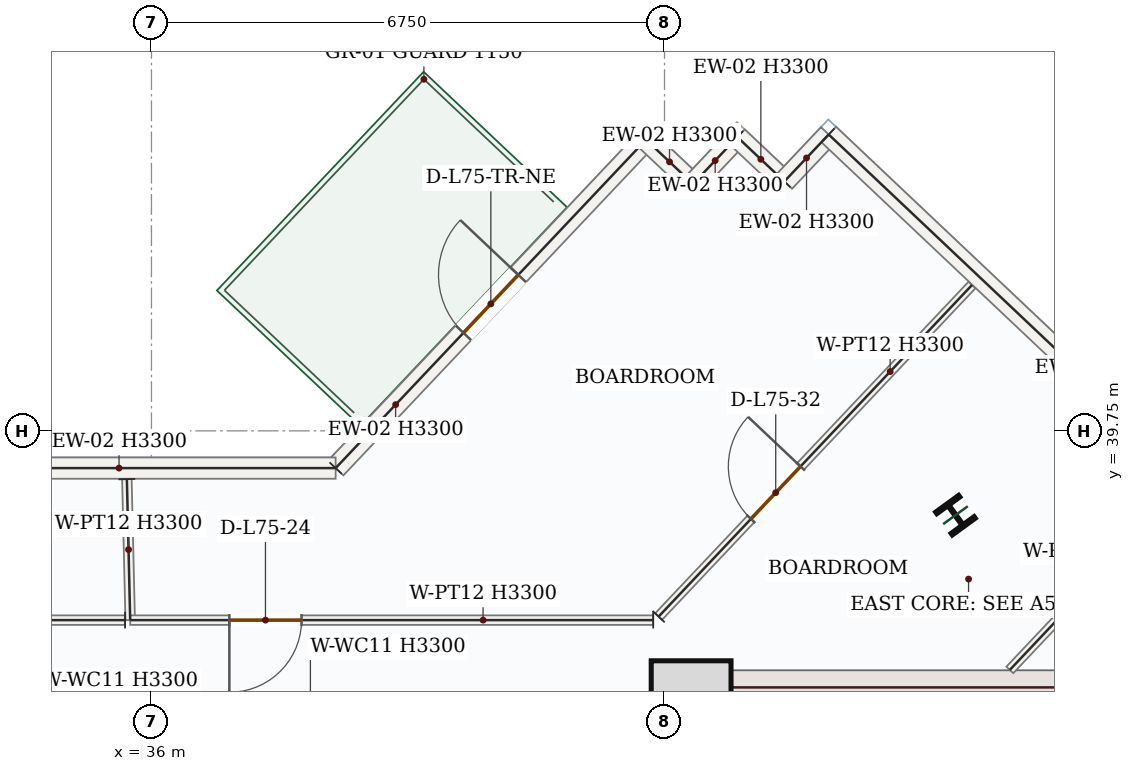
"""IFC4 building model, lengths in metres.
Left out: names, types, materials, properties, quantities, classifications, styles, units other than length and angle.
Written with IfcOpenShell. Run it as: python <this file> out.ifc"""

import sys

from ifc_helpers import new_model, si_unit, direction, frame, frame_2d, origin, origin_2d, place, context, subcontext, project, spatial, rectangle, i_section, extrude, source, transform, mapped, element, fill, save


model = new_model("IFC4")
c1 = context("Model", 3, precision=1e-05, world=origin(), true_north=direction((0.0, 1.0)))
c2 = subcontext(c1, "Body", "Model", "MODEL_VIEW")
j1 = project(units=[si_unit("LENGTHUNIT", "METRE"), si_unit("PLANEANGLEUNIT", "RADIAN")], contexts=[c1])
p1 = place(None, origin())
s1 = spatial("IfcSite", under=j1, at=p1, CompositionType="ELEMENT")
p2 = place(p1, origin())
s2 = spatial("IfcBuilding", under=s1, at=p2, CompositionType="ELEMENT")
p3 = place(p2, frame((0.0, 0.0, 310.35)))
s3 = spatial("IfcBuildingStorey", under=s2, at=p3, CompositionType="ELEMENT", Elevation=310.35)
p4 = place(p3, frame((42.975, 28.05, 0.0), z_axis=(0.0, 0.0, 1.0), x_axis=(0.0, 1.0, 0.0)))
e1 = element("IfcWall", 1, at=p4, inside=s3, PredefinedType="SHEAR", context=c2, shape_type="SweptSolid", body=[
    extrude(rectangle(XDim=8.55, YDim=0.45, at=frame_2d((4.275, 0.0))), origin(), (0.0, 0.0, 1.0), 3.3),
])
p5 = place(p4, frame((1.5, 0.0, 0.0)))
e2 = element("IfcOpeningElement", 2, at=p5, cuts=e1, PredefinedType="OPENING", context=c2, shape_type="SweptSolid", body=[
    extrude(rectangle(XDim=1.1, YDim=2.2, at=frame_2d((0.55, 1.1))), frame((0.0, 0.235, 0.0), z_axis=(0.0, -1.0, 0.0), x_axis=(1.0, 0.0, 0.0)), (0.0, 0.0, 1.0), 0.47),
])
m1 = source(origin(), c2, "Body", "SweptSolid", [
    extrude(rectangle(XDim=7.1, YDim=0.45, at=frame_2d((3.55, 0.0))), origin(), (0.0, 0.0, 1.0), 3.3),
])
p6 = place(p3, frame((43.2, 36.375, 0.0), z_axis=(0.0, 0.0, 1.0), x_axis=(1.0, 0.0, 0.0)))
e3 = element("IfcWall", 3, at=p6, inside=s3, PredefinedType="SHEAR", context=c2, shape_type="MappedRepresentation", body=[
    mapped(m1, transform((0.0, 0.0, 0.0), x_axis=(1.0, 0.0, 0.0), y_axis=(0.0, 1.0, 0.0), z_axis=(0.0, 0.0, 1.0), scale=1.0)),
])
m2 = source(origin(), c2, "Body", "SweptSolid", [
    extrude(rectangle(XDim=1.05, YDim=1.05, at=origin_2d()), origin(), (0.0, 0.0, 1.0), 3.75),
])
p7 = place(p3, frame((43.1, 36.2, 0.0), z_axis=(0.0, 0.0, 1.0), x_axis=(1.0, 0.0, 0.0)))
e4 = element("IfcColumn", 4, at=p7, inside=s3, PredefinedType="COLUMN", context=c2, shape_type="MappedRepresentation", body=[
    mapped(m2, transform((0.0, 0.0, 0.0), x_axis=(1.0, 0.0, 0.0), y_axis=(0.0, 1.0, 0.0), z_axis=(0.0, 0.0, 1.0), scale=1.0)),
])
m3 = source(origin(), c2, "Body", "SweptSolid", [
    extrude(i_section(OverallWidth=0.374, OverallDepth=0.372, WebThickness=0.016, FlangeThickness=0.026, FilletRadius=0.018, at=origin_2d()), origin(), (0.0, 0.0, 1.0), 3.75),
])
p8 = place(p3, frame((46.578, 38.641, 0.0), z_axis=(0.0, 0.0, 1.0), x_axis=(0.809016994375, 0.587785252292, 0.0)))
e5 = element("IfcColumn", 5, at=p8, inside=s3, PredefinedType="COLUMN", context=c2, shape_type="MappedRepresentation", body=[
    mapped(m3, transform((0.0, 0.0, 0.0), x_axis=(1.0, 0.0, 0.0), y_axis=(0.0, 1.0, 0.0), z_axis=(0.0, 0.0, 1.0), scale=1.0)),
])
p9 = place(p3, frame((38.423, 39.26, 0.0), z_axis=(0.0, 0.0, 1.0), x_axis=(0.686888766374, 0.72676256276, 0.0)))
e6 = element("IfcWall", 6, at=p9, inside=s3, PredefinedType="SOLIDWALL", context=c2, shape_type="SweptSolid", body=[
    extrude(rectangle(XDim=5.945, YDim=0.28, at=frame_2d((2.973, 0.0))), origin(), (0.0, 0.0, 1.0), 3.3),
])
p10 = place(p9, frame((2.448, 0.0, 0.0)))
e7 = element("IfcOpeningElement", 7, at=p10, cuts=e6, PredefinedType="OPENING", context=c2, shape_type="SweptSolid", body=[
    extrude(rectangle(XDim=1.05, YDim=2.15, at=frame_2d((0.525, 1.075))), frame((0.0, 0.15, 0.0), z_axis=(0.0, -1.0, 0.0), x_axis=(1.0, 0.0, 0.0)), (0.0, 0.0, 1.0), 0.3),
])
m4 = source(origin(), c2, "Body", "SweptSolid", [
    extrude(rectangle(XDim=0.85, YDim=0.28, at=frame_2d((0.425, 0.0))), origin(), (0.0, 0.0, 1.0), 3.3),
])
p11 = place(p3, frame((42.507, 43.581, 0.0), z_axis=(0.0, 0.0, 1.0), x_axis=(0.726790047388, -0.686859685101, 0.0)))
e8 = element("IfcWall", 8, at=p11, inside=s3, PredefinedType="SOLIDWALL", context=c2, shape_type="MappedRepresentation", body=[
    mapped(m4, transform((0.0, 0.0, 0.0), x_axis=(1.0, 0.0, 0.0), y_axis=(0.0, 1.0, 0.0), z_axis=(0.0, 0.0, 1.0), scale=1.0)),
])
m5 = source(origin(), c2, "Body", "SweptSolid", [
    extrude(rectangle(XDim=0.85, YDim=0.28, at=frame_2d((0.425, 0.0))), origin(), (0.0, 0.0, 1.0), 3.3),
])
p12 = place(p3, frame((43.125, 42.997, 0.0), z_axis=(0.0, 0.0, 1.0), x_axis=(0.687011382404, 0.726646654466, 0.0)))
e9 = element("IfcWall", 9, at=p12, inside=s3, PredefinedType="SOLIDWALL", context=c2, shape_type="MappedRepresentation", body=[
    mapped(m5, transform((0.0, 0.0, 0.0), x_axis=(1.0, 0.0, 0.0), y_axis=(0.0, 1.0, 0.0), z_axis=(0.0, 0.0, 1.0), scale=1.0)),
])
p13 = place(p3, frame((43.708, 43.615, 0.0), z_axis=(0.0, 0.0, 1.0), x_axis=(0.726790047388, -0.686859685101, 0.0)))
e10 = element("IfcWall", 10, at=p13, inside=s3, PredefinedType="SOLIDWALL", context=c2, shape_type="MappedRepresentation", body=[
    mapped(m4, transform((0.0, 0.0, 0.0), x_axis=(1.0, 0.0, 0.0), y_axis=(0.0, 1.0, 0.0), z_axis=(0.0, 0.0, 1.0), scale=1.0)),
])
p14 = place(p3, frame((44.326, 43.031, 0.0), z_axis=(0.0, 0.0, 1.0), x_axis=(0.687011382404, 0.726646654466, 0.0)))
e11 = element("IfcWall", 11, at=p14, inside=s3, PredefinedType="SOLIDWALL", context=c2, shape_type="MappedRepresentation", body=[
    mapped(m5, transform((0.0, 0.0, 0.0), x_axis=(1.0, 0.0, 0.0), y_axis=(0.0, 1.0, 0.0), z_axis=(0.0, 0.0, 1.0), scale=1.0)),
])
m6 = source(origin(), c2, "Body", "SweptSolid", [
    extrude(rectangle(XDim=9.92, YDim=0.28, at=frame_2d((4.96, 0.0))), origin(), (0.0, 0.0, 1.0), 3.3),
])
p15 = place(p3, frame((44.91, 43.649, 0.0), z_axis=(0.0, 0.0, 1.0), x_axis=(0.726772856404, -0.686877875022, 0.0)))
e12 = element("IfcWall", 12, at=p15, inside=s3, PredefinedType="SOLIDWALL", context=c2, shape_type="MappedRepresentation", body=[
    mapped(m6, transform((0.0, 0.0, 0.0), x_axis=(1.0, 0.0, 0.0), y_axis=(0.0, 1.0, 0.0), z_axis=(0.0, 0.0, 1.0), scale=1.0)),
])
m7 = source(origin(), c2, "Body", "SweptSolid", [
    extrude(rectangle(XDim=5.699, YDim=0.28, at=frame_2d((2.85, 0.0))), origin(), (0.0, 0.0, 1.0), 3.3),
])
p16 = place(p3, frame((32.724, 39.26, 0.0), z_axis=(0.0, 0.0, 1.0), x_axis=(1.0, 0.0, 0.0)))
e13 = element("IfcWall", 13, at=p16, inside=s3, PredefinedType="SOLIDWALL", context=c2, shape_type="MappedRepresentation", body=[
    mapped(m7, transform((0.0, 0.0, 0.0), x_axis=(1.0, 0.0, 0.0), y_axis=(0.0, 1.0, 0.0), z_axis=(0.0, 0.0, 1.0), scale=1.0)),
])
m8 = source(origin(), c2, "Body", "SweptSolid", [
    extrude(rectangle(XDim=3.337, YDim=0.125, at=frame_2d((1.669, 0.0))), origin(), (0.0, 0.0, 1.0), 3.3),
])
p17 = place(p3, frame((49.585, 39.031, 0.0), z_axis=(0.0, 0.0, 1.0), x_axis=(-0.686891986515, -0.726759519278, 0.0)))
e14 = element("IfcWall", 14, at=p17, inside=s3, PredefinedType="PARTITIONING", context=c2, shape_type="MappedRepresentation", body=[
    mapped(m8, transform((0.0, 0.0, 0.0), x_axis=(1.0, 0.0, 0.0), y_axis=(0.0, 1.0, 0.0), z_axis=(0.0, 0.0, 1.0), scale=1.0)),
])
p18 = place(p3, frame((42.672, 37.306, 0.0), z_axis=(0.0, 0.0, 1.0), x_axis=(0.686871949206, 0.726778456886, 0.0)))
e15 = element("IfcWall", 15, at=p18, inside=s3, PredefinedType="PARTITIONING", context=c2, shape_type="SweptSolid", body=[
    extrude(rectangle(XDim=6.001, YDim=0.125, at=frame_2d((3.001, 0.0))), origin(), (0.0, 0.0, 1.0), 3.3),
])
p19 = place(p18, frame((1.768, 0.0, 0.0)))
e16 = element("IfcOpeningElement", 16, at=p19, cuts=e15, PredefinedType="OPENING", context=c2, shape_type="SweptSolid", body=[
    extrude(rectangle(XDim=0.95, YDim=2.15, at=frame_2d((0.475, 1.075))), frame((0.0, 0.073, 0.0), z_axis=(0.0, -1.0, 0.0), x_axis=(1.0, 0.0, 0.0)), (0.0, 0.0, 1.0), 0.145),
])
m9 = source(origin(), c2, "Body", "SweptSolid", [
    extrude(rectangle(XDim=1.855, YDim=0.125, at=frame_2d((0.928, 0.0))), origin(), (0.0, 0.0, 1.0), 3.3),
])
p20 = place(p3, frame((35.677, 39.115, 0.0), z_axis=(0.0, 0.0, 1.0), x_axis=(0.023420791501, -0.999725695641, 0.0)))
e17 = element("IfcWall", 17, at=p20, inside=s3, PredefinedType="PARTITIONING", context=c2, shape_type="MappedRepresentation", body=[
    mapped(m9, transform((0.0, 0.0, 0.0), x_axis=(1.0, 0.0, 0.0), y_axis=(0.0, 1.0, 0.0), z_axis=(0.0, 0.0, 1.0), scale=1.0)),
])
p21 = place(p3, frame((35.653, 37.26, 0.0), z_axis=(0.0, 0.0, 1.0), x_axis=(-0.999999997089, -7.6303842e-05, 0.0)))
e18 = element("IfcWall", 18, at=p21, inside=s3, PredefinedType="PARTITIONING", context=c2, shape_type="SweptSolid", body=[
    extrude(rectangle(XDim=6.399, YDim=0.125, at=frame_2d((3.2, 0.0))), origin(), (0.0, 0.0, 1.0), 3.3),
])
p22 = place(p21, frame((1.199, 0.0, 0.0)))
e19 = element("IfcOpeningElement", 19, at=p22, cuts=e18, PredefinedType="OPENING", context=c2, shape_type="SweptSolid", body=[
    extrude(rectangle(XDim=0.95, YDim=2.15, at=frame_2d((0.475, 1.075))), frame((0.0, 0.073, 0.0), z_axis=(0.0, -1.0, 0.0), x_axis=(1.0, 0.0, 0.0)), (0.0, 0.0, 1.0), 0.145),
])
p23 = place(p3, frame((42.601, 37.26, 0.0), z_axis=(0.0, 0.0, 1.0), x_axis=(-1.0, 0.0, 0.0)))
e20 = element("IfcWall", 20, at=p23, inside=s3, PredefinedType="PARTITIONING", context=c2, shape_type="SweptSolid", body=[
    extrude(rectangle(XDim=6.881, YDim=0.125, at=frame_2d((3.44, 0.0))), origin(), (0.0, 0.0, 1.0), 3.3),
])
p24 = place(p23, frame((4.626, 0.0, 0.0)))
e21 = element("IfcOpeningElement", 21, at=p24, cuts=e20, PredefinedType="OPENING", context=c2, shape_type="SweptSolid", body=[
    extrude(rectangle(XDim=0.95, YDim=2.15, at=frame_2d((0.475, 1.075))), frame((0.0, 0.073, 0.0), z_axis=(0.0, -1.0, 0.0), x_axis=(1.0, 0.0, 0.0)), (0.0, 0.0, 1.0), 0.145),
])
m10 = source(origin(), c2, "Body", "SweptSolid", [
    extrude(rectangle(XDim=1.05, YDim=2.15, at=frame_2d((0.525, 1.075))), frame((0.0, 0.025, 0.0), z_axis=(0.0, -1.0, 0.0), x_axis=(1.0, 0.0, 0.0)), (0.0, 0.0, 1.0), 0.05),
])
p25 = place(p10, origin())
e22 = element("IfcDoor", 22, at=p25, inside=s3, OperationType="SINGLE_SWING_RIGHT", PredefinedType="DOOR", context=c2, shape_type="MappedRepresentation", body=[
    mapped(m10, transform((0.0, 0.0, 0.0), x_axis=(1.0, 0.0, 0.0), y_axis=(0.0, 1.0, 0.0), z_axis=(0.0, 0.0, 1.0), scale=1.0)),
])
fill(e7, e22)
m11 = source(origin(), c2, "Body", "SweptSolid", [
    extrude(rectangle(XDim=0.95, YDim=2.15, at=frame_2d((0.475, 1.075))), frame((0.0, 0.025, 0.0), z_axis=(0.0, -1.0, 0.0), x_axis=(1.0, 0.0, 0.0)), (0.0, 0.0, 1.0), 0.05),
])
p26 = place(p24, origin())
e23 = element("IfcDoor", 23, at=p26, inside=s3, OperationType="SINGLE_SWING_RIGHT", PredefinedType="DOOR", context=c2, shape_type="MappedRepresentation", body=[
    mapped(m11, transform((0.0, 0.0, 0.0), x_axis=(1.0, 0.0, 0.0), y_axis=(0.0, 1.0, 0.0), z_axis=(0.0, 0.0, 1.0), scale=1.0)),
])
fill(e21, e23)
p27 = place(p19, origin())
e24 = element("IfcDoor", 24, at=p27, inside=s3, OperationType="SINGLE_SWING_RIGHT", PredefinedType="DOOR", context=c2, shape_type="MappedRepresentation", body=[
    mapped(m11, transform((0.0, 0.0, 0.0), x_axis=(1.0, 0.0, 0.0), y_axis=(0.0, 1.0, 0.0), z_axis=(0.0, 0.0, 1.0), scale=1.0)),
])
fill(e16, e24)
save(model, sys.argv[1])
